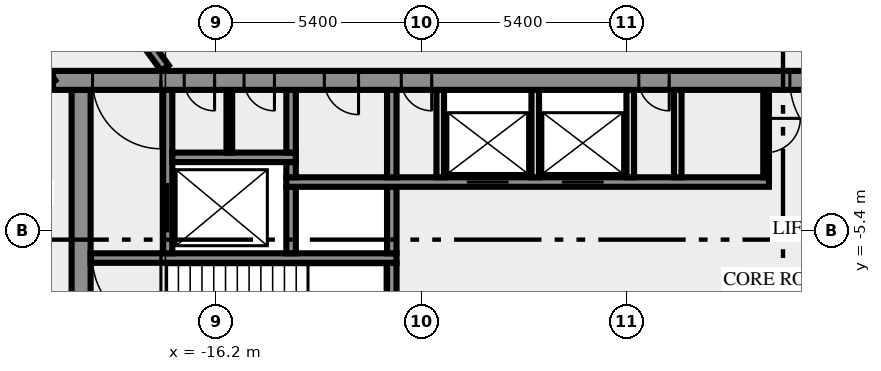
"""IFC4 building model, lengths in metres.
Left out: names, types, materials, properties, quantities, classifications, styles, units other than length and angle.
Written with IfcOpenShell. Run it as: python <this file> out.ifc"""

import sys

from ifc_helpers import new_model, si_unit, direction, frame, frame_2d, origin, place, context, subcontext, project, spatial, rectangle, extrude, element, fill, save


model = new_model("IFC4")
c1 = context("Model", 3, precision=1e-05, world=origin(), true_north=direction((0.0, 1.0)))
c2 = subcontext(c1, "Body", "Model", "MODEL_VIEW")
j1 = project(units=[si_unit("LENGTHUNIT", "METRE"), si_unit("PLANEANGLEUNIT", "RADIAN")], contexts=[c1])
p1 = place(None, origin())
s1 = spatial("IfcSite", under=j1, at=p1, CompositionType="ELEMENT")
p2 = place(p1, origin())
s2 = spatial("IfcBuilding", under=s1, at=p2, CompositionType="ELEMENT")
p3 = place(p2, frame((0.0, 0.0, 265.0)))
s3 = spatial("IfcBuildingStorey", under=s2, at=p3, CompositionType="ELEMENT", Elevation=265.0)
p4 = place(p3, frame((-19.75, -10.5, 0.0), z_axis=(0.0, 0.0, 1.0), x_axis=(0.0, 1.0, 0.0)))
e1 = element("IfcWall", 1, at=p4, inside=s3, PredefinedType="SHEAR", context=c2, shape_type="SweptSolid", body=[
    extrude(rectangle(XDim=8.8, YDim=0.5, at=frame_2d((4.4, 0.0))), origin(), (0.0, 0.0, 1.0), 3.65),
])
p5 = place(p3, frame((-11.575, -7.25, 0.0), z_axis=(0.0, 0.0, 1.0), x_axis=(0.0, 1.0, 0.0)))
e2 = element("IfcWall", 2, at=p5, inside=s3, PredefinedType="SHEAR", context=c2, shape_type="SweptSolid", body=[
    extrude(rectangle(XDim=1.0, YDim=0.25, at=frame_2d((0.5, 0.0))), origin(), (0.0, 0.0, 1.0), 3.65),
])
p6 = place(p3, frame((-11.45, -6.125, 0.0), z_axis=(0.0, 0.0, 1.0), x_axis=(-1.0, 0.0, 0.0)))
e3 = element("IfcWall", 3, at=p6, inside=s3, PredefinedType="SHEAR", context=c2, shape_type="SweptSolid", body=[
    extrude(rectangle(XDim=8.05, YDim=0.25, at=frame_2d((4.025, 0.0))), origin(), (0.0, 0.0, 1.0), 3.65),
])
p7 = place(p6, frame((6.2, 0.0, 0.0)))
e4 = element("IfcOpeningElement", 4, at=p7, cuts=e3, PredefinedType="OPENING", context=c2, shape_type="SweptSolid", body=[
    extrude(rectangle(XDim=1.8, YDim=2.1, at=frame_2d((0.9, 1.05))), frame((0.0, 0.135, 0.0), z_axis=(0.0, -1.0, 0.0), x_axis=(1.0, 0.0, 0.0)), (0.0, 0.0, 1.0), 0.27),
])
p8 = place(p3, frame((-17.475, -6.0, 0.0), z_axis=(0.0, 0.0, 1.0), x_axis=(0.0, 1.0, 0.0)))
e5 = element("IfcWall", 5, at=p8, inside=s3, PredefinedType="SHEAR", context=c2, shape_type="SweptSolid", body=[
    extrude(rectangle(XDim=4.3, YDim=0.25, at=frame_2d((2.15, 0.0))), origin(), (0.0, 0.0, 1.0), 3.65),
])
p9 = place(p8, frame((0.55, 0.0, 0.0)))
e6 = element("IfcOpeningElement", 6, at=p9, cuts=e5, PredefinedType="OPENING", context=c2, shape_type="SweptSolid", body=[
    extrude(rectangle(XDim=1.3, YDim=2.1, at=frame_2d((0.65, 1.05))), frame((0.0, 0.135, 0.0), z_axis=(0.0, -1.0, 0.0), x_axis=(1.0, 0.0, 0.0)), (0.0, 0.0, 1.0), 0.27),
])
for number, where, z_axis, x_axis in (
    (7, (-14.225, -6.0, 0.0), (0.0, 0.0, 1.0), (0.0, 1.0, 0.0)),
    (8, (-11.575, -6.0, 0.0), (0.0, 0.0, 1.0), (0.0, 1.0, 0.0)),
):
    element("IfcWall", number, at=place(p3, frame(where, z_axis=z_axis, x_axis=x_axis)), inside=s3, PredefinedType="SHEAR", context=c2, shape_type="SweptSolid", body=[
        extrude(rectangle(XDim=1.75, YDim=0.25, at=frame_2d((0.875, 0.0))), origin(), (0.0, 0.0, 1.0), 3.65),
    ])
p10 = place(p3, frame((-14.35, -4.125, 0.0), z_axis=(0.0, 0.0, 1.0), x_axis=(1.0, 0.0, 0.0)))
e9 = element("IfcWall", 9, at=p10, inside=s3, PredefinedType="SHEAR", context=c2, shape_type="SweptSolid", body=[
    extrude(rectangle(XDim=12.7, YDim=0.25, at=frame_2d((6.35, 0.0))), origin(), (0.0, 0.0, 1.0), 3.65),
])
p11 = place(p10, frame((4.75, 0.0, 0.0)))
e10 = element("IfcOpeningElement", 10, at=p11, cuts=e9, PredefinedType="OPENING", context=c2, shape_type="SweptSolid", body=[
    extrude(rectangle(XDim=1.1, YDim=2.1, at=frame_2d((0.55, 1.05))), frame((0.0, 0.135, 0.0), z_axis=(0.0, -1.0, 0.0), x_axis=(1.0, 0.0, 0.0)), (0.0, 0.0, 1.0), 0.27),
])
p12 = place(p10, frame((7.25, 0.0, 0.0)))
e11 = element("IfcOpeningElement", 11, at=p12, cuts=e9, PredefinedType="OPENING", context=c2, shape_type="SweptSolid", body=[
    extrude(rectangle(XDim=1.1, YDim=2.1, at=frame_2d((0.55, 1.05))), frame((0.0, 0.135, 0.0), z_axis=(0.0, -1.0, 0.0), x_axis=(1.0, 0.0, 0.0)), (0.0, 0.0, 1.0), 0.27),
])
p13 = place(p3, frame((-14.225, -4.0, 0.0), z_axis=(0.0, 0.0, 1.0), x_axis=(0.0, 1.0, 0.0)))
e12 = element("IfcWall", 12, at=p13, inside=s3, PredefinedType="SHEAR", context=c2, shape_type="SweptSolid", body=[
    extrude(rectangle(XDim=0.4, YDim=0.25, at=frame_2d((0.2, 0.0))), origin(), (0.0, 0.0, 1.0), 3.65),
])
p14 = place(p3, frame((-11.575, -4.0, 0.0), z_axis=(0.0, 0.0, 1.0), x_axis=(0.0, 1.0, 0.0)))
e13 = element("IfcWall", 13, at=p14, inside=s3, PredefinedType="SHEAR", context=c2, shape_type="SweptSolid", body=[
    extrude(rectangle(XDim=2.3, YDim=0.25, at=frame_2d((1.15, 0.0))), origin(), (0.0, 0.0, 1.0), 3.65),
])
for number, where, z_axis, x_axis in (
    (14, (-10.3, -4.0, 0.0), (0.0, 0.0, 1.0), (0.0, 1.0, 0.0)),
    (15, (-7.8, -4.0, 0.0), (0.0, 0.0, 1.0), (0.0, 1.0, 0.0)),
    (16, (-5.3, -4.0, 0.0), (0.0, 0.0, 1.0), (0.0, 1.0, 0.0)),
    (17, (-4.05, -4.0, 0.0), (0.0, 0.0, 1.0), (0.0, 1.0, 0.0)),
):
    element("IfcWall", number, at=place(p3, frame(where, z_axis=z_axis, x_axis=x_axis)), inside=s3, PredefinedType="SOLIDWALL", context=c2, shape_type="SweptSolid", body=[
        extrude(rectangle(XDim=2.3, YDim=0.2, at=frame_2d((1.15, 0.0))), origin(), (0.0, 0.0, 1.0), 3.65),
    ])
p15 = place(p3, frame((-1.725, -1.7, 0.0), z_axis=(0.0, 0.0, 1.0), x_axis=(0.0, -1.0, 0.0)))
e18 = element("IfcWall", 18, at=p15, inside=s3, PredefinedType="PARTITIONING", context=c2, shape_type="SweptSolid", body=[
    extrude(rectangle(XDim=2.3, YDim=0.15, at=frame_2d((1.15, 0.0))), origin(), (0.0, 0.0, 1.0), 3.65),
])
p16 = place(p15, frame((0.75, 0.0, 0.0)))
e19 = element("IfcOpeningElement", 19, at=p16, cuts=e18, PredefinedType="OPENING", context=c2, shape_type="SweptSolid", body=[
    extrude(rectangle(XDim=0.9, YDim=2.1, at=frame_2d((0.45, 1.05))), frame((0.0, 0.085, 0.0), z_axis=(0.0, -1.0, 0.0), x_axis=(1.0, 0.0, 0.0)), (0.0, 0.0, 1.0), 0.17),
])
p17 = place(p3, frame((-17.35, -3.475, 0.0), z_axis=(0.0, 0.0, 1.0), x_axis=(1.0, 0.0, 0.0)))
e20 = element("IfcWall", 20, at=p17, inside=s3, PredefinedType="SHEAR", context=c2, shape_type="SweptSolid", body=[
    extrude(rectangle(XDim=3.25, YDim=0.25, at=frame_2d((1.625, 0.0))), origin(), (0.0, 0.0, 1.0), 3.65),
])
p18 = place(p3, frame((-15.85, -3.35, 0.0), z_axis=(0.0, 0.0, 1.0), x_axis=(0.0, 1.0, 0.0)))
e21 = element("IfcWall", 21, at=p18, inside=s3, PredefinedType="PARTITIONING", context=c2, shape_type="SweptSolid", body=[
    extrude(rectangle(XDim=1.65, YDim=0.15, at=frame_2d((0.825, 0.0))), origin(), (0.0, 0.0, 1.0), 3.65),
])
p19 = place(p3, frame((-14.225, -3.35, 0.0), z_axis=(0.0, 0.0, 1.0), x_axis=(0.0, 1.0, 0.0)))
e22 = element("IfcWall", 22, at=p19, inside=s3, PredefinedType="SHEAR", context=c2, shape_type="SweptSolid", body=[
    extrude(rectangle(XDim=1.65, YDim=0.25, at=frame_2d((0.825, 0.0))), origin(), (0.0, 0.0, 1.0), 3.65),
])
p20 = place(p3, frame((20.49, -1.45, 0.0), z_axis=(0.0, 0.0, 1.0), x_axis=(-1.0, 0.0, 0.0)))
e23 = element("IfcWall", 23, at=p20, inside=s3, PredefinedType="SHEAR", context=c2, shape_type="SweptSolid", body=[
    extrude(rectangle(XDim=40.98, YDim=0.5, at=frame_2d((20.49, 0.0))), origin(), (0.0, 0.0, 1.0), 3.65),
])
p21 = place(p20, frame((38.14, 0.0, 0.0)))
e24 = element("IfcOpeningElement", 24, at=p21, cuts=e23, PredefinedType="OPENING", context=c2, shape_type="SweptSolid", body=[
    extrude(rectangle(XDim=1.8, YDim=2.1, at=frame_2d((0.9, 1.05))), frame((0.0, 0.26, 0.0), z_axis=(0.0, -1.0, 0.0), x_axis=(1.0, 0.0, 0.0)), (0.0, 0.0, 1.0), 0.52),
])
p22 = place(p20, frame((36.728, 0.0, 0.0)))
e25 = element("IfcOpeningElement", 25, at=p22, cuts=e23, PredefinedType="OPENING", context=c2, shape_type="SweptSolid", body=[
    extrude(rectangle(XDim=0.8, YDim=2.1, at=frame_2d((0.4, 1.05))), frame((0.0, 0.26, 0.0), z_axis=(0.0, -1.0, 0.0), x_axis=(1.0, 0.0, 0.0)), (0.0, 0.0, 1.0), 0.52),
])
p23 = place(p20, frame((35.153, 0.0, 0.0)))
e26 = element("IfcOpeningElement", 26, at=p23, cuts=e23, PredefinedType="OPENING", context=c2, shape_type="SweptSolid", body=[
    extrude(rectangle(XDim=0.8, YDim=2.1, at=frame_2d((0.4, 1.05))), frame((0.0, 0.26, 0.0), z_axis=(0.0, -1.0, 0.0), x_axis=(1.0, 0.0, 0.0)), (0.0, 0.0, 1.0), 0.52),
])
p24 = place(p20, frame((32.94, 0.0, 0.0)))
e27 = element("IfcOpeningElement", 27, at=p24, cuts=e23, PredefinedType="OPENING", context=c2, shape_type="SweptSolid", body=[
    extrude(rectangle(XDim=0.9, YDim=2.1, at=frame_2d((0.45, 1.05))), frame((0.0, 0.26, 0.0), z_axis=(0.0, -1.0, 0.0), x_axis=(1.0, 0.0, 0.0)), (0.0, 0.0, 1.0), 0.52),
])
p25 = place(p20, frame((31.015, 0.0, 0.0)))
e28 = element("IfcOpeningElement", 28, at=p25, cuts=e23, PredefinedType="OPENING", context=c2, shape_type="SweptSolid", body=[
    extrude(rectangle(XDim=0.8, YDim=2.1, at=frame_2d((0.4, 1.05))), frame((0.0, 0.26, 0.0), z_axis=(0.0, -1.0, 0.0), x_axis=(1.0, 0.0, 0.0)), (0.0, 0.0, 1.0), 0.52),
])
p26 = place(p20, frame((24.765, 0.0, 0.0)))
e29 = element("IfcOpeningElement", 29, at=p26, cuts=e23, PredefinedType="OPENING", context=c2, shape_type="SweptSolid", body=[
    extrude(rectangle(XDim=0.8, YDim=2.1, at=frame_2d((0.4, 1.05))), frame((0.0, 0.26, 0.0), z_axis=(0.0, -1.0, 0.0), x_axis=(1.0, 0.0, 0.0)), (0.0, 0.0, 1.0), 0.52),
])
p27 = place(p20, frame((19.59, 0.0, 0.0)))
e30 = element("IfcOpeningElement", 30, at=p27, cuts=e23, PredefinedType="OPENING", context=c2, shape_type="SweptSolid", body=[
    extrude(rectangle(XDim=2.0, YDim=2.1, at=frame_2d((1.0, 1.05))), frame((0.0, 0.26, 0.0), z_axis=(0.0, -1.0, 0.0), x_axis=(1.0, 0.0, 0.0)), (0.0, 0.0, 1.0), 0.52),
])
p28 = place(p20, frame((13.202, 0.0, 0.0)))
e31 = element("IfcOpeningElement", 31, at=p28, cuts=e23, PredefinedType="OPENING", context=c2, shape_type="SweptSolid", body=[
    extrude(rectangle(XDim=0.9, YDim=2.1, at=frame_2d((0.45, 1.05))), frame((0.0, 0.26, 0.0), z_axis=(0.0, -1.0, 0.0), x_axis=(1.0, 0.0, 0.0)), (0.0, 0.0, 1.0), 0.52),
])
p29 = place(p20, frame((9.478, 0.0, 0.0)))
e32 = element("IfcOpeningElement", 32, at=p29, cuts=e23, PredefinedType="OPENING", context=c2, shape_type="SweptSolid", body=[
    extrude(rectangle(XDim=0.9, YDim=2.1, at=frame_2d((0.45, 1.05))), frame((0.0, 0.26, 0.0), z_axis=(0.0, -1.0, 0.0), x_axis=(1.0, 0.0, 0.0)), (0.0, 0.0, 1.0), 0.52),
])
p30 = place(p20, frame((7.14, 0.0, 0.0)))
e33 = element("IfcOpeningElement", 33, at=p30, cuts=e23, PredefinedType="OPENING", context=c2, shape_type="SweptSolid", body=[
    extrude(rectangle(XDim=0.9, YDim=2.1, at=frame_2d((0.45, 1.05))), frame((0.0, 0.26, 0.0), z_axis=(0.0, -1.0, 0.0), x_axis=(1.0, 0.0, 0.0)), (0.0, 0.0, 1.0), 0.52),
])
p31 = place(p20, frame((4.19, 0.0, 0.0)))
e34 = element("IfcOpeningElement", 34, at=p31, cuts=e23, PredefinedType="OPENING", context=c2, shape_type="SweptSolid", body=[
    extrude(rectangle(XDim=0.9, YDim=2.1, at=frame_2d((0.45, 1.05))), frame((0.0, 0.26, 0.0), z_axis=(0.0, -1.0, 0.0), x_axis=(1.0, 0.0, 0.0)), (0.0, 0.0, 1.0), 0.52),
])
p32 = place(p20, frame((1.04, 0.0, 0.0)))
e35 = element("IfcOpeningElement", 35, at=p32, cuts=e23, PredefinedType="OPENING", context=c2, shape_type="SweptSolid", body=[
    extrude(rectangle(XDim=1.8, YDim=2.1, at=frame_2d((0.9, 1.05))), frame((0.0, 0.26, 0.0), z_axis=(0.0, -1.0, 0.0), x_axis=(1.0, 0.0, 0.0)), (0.0, 0.0, 1.0), 0.52),
])
p33 = place(p3, frame((-20.531, -1.523, 0.0), z_axis=(0.0, 0.0, 1.0), x_axis=(-0.587786711753, 0.809015934013, 0.0)))
e36 = element("IfcWall", 36, at=p33, inside=s3, PredefinedType="SOLIDWALL", context=c2, shape_type="SweptSolid", body=[
    extrude(rectangle(XDim=21.911, YDim=0.25, at=frame_2d((10.956, 0.0))), origin(), (0.0, 0.0, 1.0), 3.65),
])
p34 = place(p33, frame((0.533, 0.0, 0.0)))
e37 = element("IfcOpeningElement", 37, at=p34, cuts=e36, PredefinedType="OPENING", context=c2, shape_type="SweptSolid", body=[
    extrude(rectangle(XDim=0.9, YDim=2.1, at=frame_2d((0.45, 1.05))), frame((0.0, 0.135, 0.0), z_axis=(0.0, -1.0, 0.0), x_axis=(1.0, 0.0, 0.0)), (0.0, 0.0, 1.0), 0.27),
])
p35 = place(p33, frame((7.816, 0.0, 0.0)))
e38 = element("IfcOpeningElement", 38, at=p35, cuts=e36, PredefinedType="OPENING", context=c2, shape_type="SweptSolid", body=[
    extrude(rectangle(XDim=0.9, YDim=2.1, at=frame_2d((0.45, 1.05))), frame((0.0, 0.135, 0.0), z_axis=(0.0, -1.0, 0.0), x_axis=(1.0, 0.0, 0.0)), (0.0, 0.0, 1.0), 0.27),
])
p36 = place(p3, frame((-31.267, 17.762, 0.0), z_axis=(0.0, 0.0, 1.0), x_axis=(0.587787966774, -0.809015022181, 0.0)))
e39 = element("IfcWall", 39, at=p36, inside=s3, PredefinedType="SOLIDWALL", context=c2, shape_type="SweptSolid", body=[
    extrude(rectangle(XDim=23.345, YDim=0.25, at=frame_2d((11.672, 0.0))), origin(), (0.0, 0.0, 1.0), 3.65),
])
p37 = place(p36, frame((19.004, 0.0, 0.0)))
e40 = element("IfcOpeningElement", 40, at=p37, cuts=e39, PredefinedType="OPENING", context=c2, shape_type="SweptSolid", body=[
    extrude(rectangle(XDim=0.9, YDim=2.1, at=frame_2d((0.45, 1.05))), frame((0.0, 0.135, 0.0), z_axis=(0.0, -1.0, 0.0), x_axis=(1.0, 0.0, 0.0)), (0.0, 0.0, 1.0), 0.27),
])
p38 = place(p7, origin())
e41 = element("IfcDoor", 41, at=p38, inside=s3, OperationType="DOUBLE_DOOR_SINGLE_SWING", PredefinedType="DOOR", context=c2, shape_type="SweptSolid", body=[
    extrude(rectangle(XDim=1.8, YDim=2.1, at=frame_2d((0.9, 1.05))), frame((0.0, 0.025, 0.0), z_axis=(0.0, -1.0, 0.0), x_axis=(1.0, 0.0, 0.0)), (0.0, 0.0, 1.0), 0.05),
])
fill(e4, e41)
p39 = place(p9, origin())
e42 = element("IfcDoor", 42, at=p39, inside=s3, OperationType="DOUBLE_DOOR_SLIDING", PredefinedType="DOOR", context=c2, shape_type="SweptSolid", body=[
    extrude(rectangle(XDim=1.3, YDim=2.1, at=frame_2d((0.65, 1.05))), frame((0.0, 0.025, 0.0), z_axis=(0.0, -1.0, 0.0), x_axis=(1.0, 0.0, 0.0)), (0.0, 0.0, 1.0), 0.05),
])
fill(e6, e42)
p40 = place(p11, origin())
e43 = element("IfcDoor", 43, at=p40, inside=s3, OperationType="DOUBLE_DOOR_SLIDING", PredefinedType="DOOR", context=c2, shape_type="SweptSolid", body=[
    extrude(rectangle(XDim=1.1, YDim=2.1, at=frame_2d((0.55, 1.05))), frame((0.0, 0.025, 0.0), z_axis=(0.0, -1.0, 0.0), x_axis=(1.0, 0.0, 0.0)), (0.0, 0.0, 1.0), 0.05),
])
fill(e10, e43)
p41 = place(p12, origin())
e44 = element("IfcDoor", 44, at=p41, inside=s3, OperationType="DOUBLE_DOOR_SLIDING", PredefinedType="DOOR", context=c2, shape_type="SweptSolid", body=[
    extrude(rectangle(XDim=1.1, YDim=2.1, at=frame_2d((0.55, 1.05))), frame((0.0, 0.025, 0.0), z_axis=(0.0, -1.0, 0.0), x_axis=(1.0, 0.0, 0.0)), (0.0, 0.0, 1.0), 0.05),
])
fill(e11, e44)
p42 = place(p16, origin())
e45 = element("IfcDoor", 45, at=p42, inside=s3, OperationType="SINGLE_SWING_RIGHT", PredefinedType="DOOR", context=c2, shape_type="SweptSolid", body=[
    extrude(rectangle(XDim=0.9, YDim=2.1, at=frame_2d((0.45, 1.05))), frame((0.0, 0.025, 0.0), z_axis=(0.0, -1.0, 0.0), x_axis=(1.0, 0.0, 0.0)), (0.0, 0.0, 1.0), 0.05),
])
fill(e19, e45)
p43 = place(p21, origin())
e46 = element("IfcDoor", 46, at=p43, inside=s3, OperationType="DOUBLE_DOOR_SINGLE_SWING", PredefinedType="DOOR", context=c2, shape_type="SweptSolid", body=[
    extrude(rectangle(XDim=1.8, YDim=2.1, at=frame_2d((0.9, 1.05))), frame((0.0, 0.025, 0.0), z_axis=(0.0, -1.0, 0.0), x_axis=(1.0, 0.0, 0.0)), (0.0, 0.0, 1.0), 0.05),
])
fill(e24, e46)
p44 = place(p22, origin())
e47 = element("IfcDoor", 47, at=p44, inside=s3, OperationType="SINGLE_SWING_RIGHT", PredefinedType="DOOR", context=c2, shape_type="SweptSolid", body=[
    extrude(rectangle(XDim=0.8, YDim=2.1, at=frame_2d((0.4, 1.05))), frame((0.0, 0.025, 0.0), z_axis=(0.0, -1.0, 0.0), x_axis=(1.0, 0.0, 0.0)), (0.0, 0.0, 1.0), 0.05),
])
fill(e25, e47)
p45 = place(p23, origin())
e48 = element("IfcDoor", 48, at=p45, inside=s3, OperationType="SINGLE_SWING_RIGHT", PredefinedType="DOOR", context=c2, shape_type="SweptSolid", body=[
    extrude(rectangle(XDim=0.8, YDim=2.1, at=frame_2d((0.4, 1.05))), frame((0.0, 0.025, 0.0), z_axis=(0.0, -1.0, 0.0), x_axis=(1.0, 0.0, 0.0)), (0.0, 0.0, 1.0), 0.05),
])
fill(e26, e48)
p46 = place(p24, origin())
e49 = element("IfcDoor", 49, at=p46, inside=s3, OperationType="SINGLE_SWING_RIGHT", PredefinedType="DOOR", context=c2, shape_type="SweptSolid", body=[
    extrude(rectangle(XDim=0.9, YDim=2.1, at=frame_2d((0.45, 1.05))), frame((0.0, 0.025, 0.0), z_axis=(0.0, -1.0, 0.0), x_axis=(1.0, 0.0, 0.0)), (0.0, 0.0, 1.0), 0.05),
])
fill(e27, e49)
p47 = place(p25, origin())
e50 = element("IfcDoor", 50, at=p47, inside=s3, OperationType="SINGLE_SWING_RIGHT", PredefinedType="DOOR", context=c2, shape_type="SweptSolid", body=[
    extrude(rectangle(XDim=0.8, YDim=2.1, at=frame_2d((0.4, 1.05))), frame((0.0, 0.025, 0.0), z_axis=(0.0, -1.0, 0.0), x_axis=(1.0, 0.0, 0.0)), (0.0, 0.0, 1.0), 0.05),
])
fill(e28, e50)
p48 = place(p26, origin())
e51 = element("IfcDoor", 51, at=p48, inside=s3, OperationType="SINGLE_SWING_RIGHT", PredefinedType="DOOR", context=c2, shape_type="SweptSolid", body=[
    extrude(rectangle(XDim=0.8, YDim=2.1, at=frame_2d((0.4, 1.05))), frame((0.0, 0.025, 0.0), z_axis=(0.0, -1.0, 0.0), x_axis=(1.0, 0.0, 0.0)), (0.0, 0.0, 1.0), 0.05),
])
fill(e29, e51)
p49 = place(p27, origin())
e52 = element("IfcDoor", 52, at=p49, inside=s3, OperationType="DOUBLE_DOOR_SINGLE_SWING", PredefinedType="DOOR", context=c2, shape_type="SweptSolid", body=[
    extrude(rectangle(XDim=2.0, YDim=2.1, at=frame_2d((1.0, 1.05))), frame((0.0, 0.025, 0.0), z_axis=(0.0, -1.0, 0.0), x_axis=(1.0, 0.0, 0.0)), (0.0, 0.0, 1.0), 0.05),
])
fill(e30, e52)
save(model, sys.argv[1])
